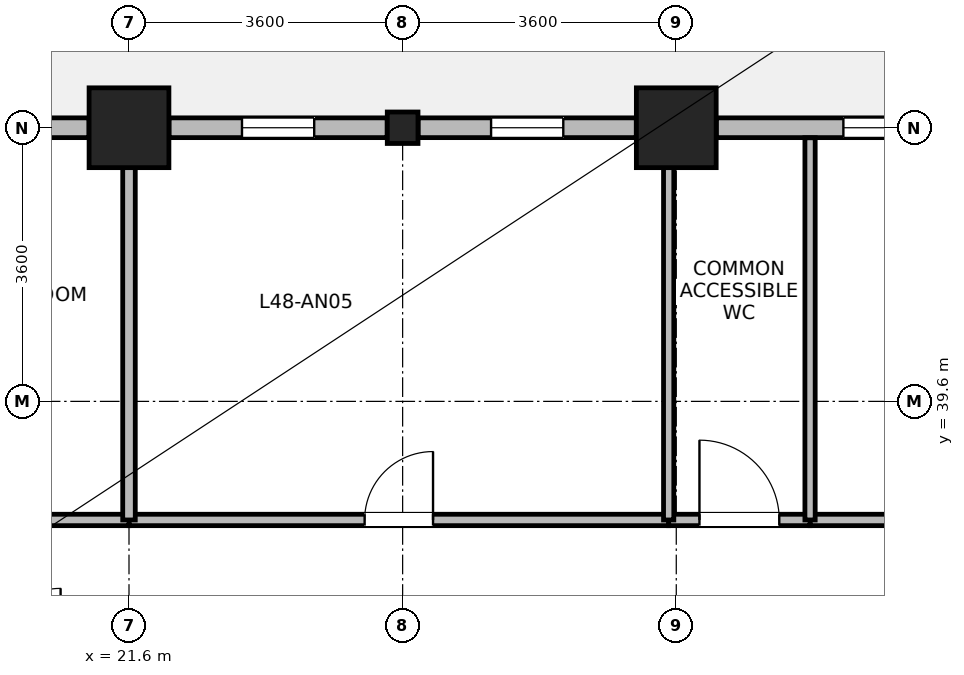
"""IFC4 building model, lengths in metres.
Left out: names, types, materials, properties, quantities, classifications, styles, units other than length and angle.
Written with IfcOpenShell. Run it as: python <this file> out.ifc"""

import sys

from ifc_helpers import new_model, si_unit, direction, frame, frame_2d, origin, origin_2d, place, context, subcontext, project, spatial, rectangle, i_section, extrude, source, transform, mapped, element, fill, save


model = new_model("IFC4")
c1 = context("Model", 3, precision=1e-05, world=origin(), true_north=direction((0.0, 1.0)))
c2 = subcontext(c1, "Body", "Model", "MODEL_VIEW")
j1 = project(units=[si_unit("LENGTHUNIT", "METRE"), si_unit("PLANEANGLEUNIT", "RADIAN")], contexts=[c1])
p1 = place(None, origin())
s1 = spatial("IfcSite", under=j1, at=p1, CompositionType="ELEMENT")
p2 = place(p1, origin())
s2 = spatial("IfcBuilding", under=s1, at=p2, CompositionType="ELEMENT")
p3 = place(p2, frame((0.0, 0.0, 188.3)))
s3 = spatial("IfcBuildingStorey", under=s2, at=p3, CompositionType="ELEMENT", Elevation=188.3)
m1 = source(origin(), c2, "Body", "SweptSolid", [
    extrude(rectangle(XDim=1.05, YDim=1.05, at=origin_2d()), origin(), (0.0, 0.0, 1.0), 3.7),
])
for number, where, z_axis, x_axis in (
    (1, (21.6, 43.2, 0.0), (0.0, 0.0, 1.0), (1.0, 0.0, 0.0)),
    (2, (28.8, 43.2, 0.0), (0.0, 0.0, 1.0), (1.0, 0.0, 0.0)),
):
    element("IfcColumn", number, at=place(p3, frame(where, z_axis=z_axis, x_axis=x_axis)), inside=s3, PredefinedType="COLUMN", context=c2, shape_type="MappedRepresentation", body=[
        mapped(m1, transform((0.0, 0.0, 0.0), x_axis=(1.0, 0.0, 0.0), y_axis=(0.0, 1.0, 0.0), z_axis=(0.0, 0.0, 1.0), scale=1.0)),
    ])
m2 = source(origin(), c2, "Body", "SweptSolid", [
    extrude(i_section(OverallWidth=0.404, OverallDepth=0.414, WebThickness=0.021, FlangeThickness=0.028, FilletRadius=0.015, at=origin_2d()), origin(), (0.0, 0.0, 1.0), 3.7),
])
p4 = place(p3, frame((25.2, 43.2, 0.0), z_axis=(0.0, 0.0, 1.0), x_axis=(1.0, 0.0, 0.0)))
e3 = element("IfcColumn", 3, at=p4, inside=s3, PredefinedType="COLUMN", context=c2, shape_type="MappedRepresentation", body=[
    mapped(m2, transform((0.0, 0.0, 0.0), x_axis=(1.0, 0.0, 0.0), y_axis=(0.0, 1.0, 0.0), z_axis=(0.0, 0.0, 1.0), scale=1.0)),
])
p5 = place(p3, frame((29.326, 43.2, 0.0), z_axis=(0.0, 0.0, 1.0), x_axis=(1.0, 0.0, 0.0)))
e4 = element("IfcWall", 4, at=p5, inside=s3, PredefinedType="STANDARD", context=c2, shape_type="SweptSolid", body=[
    extrude(rectangle(XDim=2.871, YDim=0.26, at=frame_2d((1.436, 0.0))), origin(), (0.0, 0.0, 1.0), 2.87),
])
p6 = place(p5, frame((1.673, 0.0, 0.85)))
e5 = element("IfcOpeningElement", 5, at=p6, cuts=e4, PredefinedType="OPENING", context=c2, shape_type="SweptSolid", body=[
    extrude(rectangle(XDim=0.95, YDim=1.75, at=frame_2d((0.475, 0.875))), frame((0.0, 0.14, 0.0), z_axis=(0.0, -1.0, 0.0), x_axis=(1.0, 0.0, 0.0)), (0.0, 0.0, 1.0), 0.28),
])
p7 = place(p3, frame((25.403, 43.2, 0.0), z_axis=(0.0, 0.0, 1.0), x_axis=(1.0, 0.0, 0.0)))
e6 = element("IfcWall", 6, at=p7, inside=s3, PredefinedType="STANDARD", context=c2, shape_type="SweptSolid", body=[
    extrude(rectangle(XDim=2.871, YDim=0.26, at=frame_2d((1.436, 0.0))), origin(), (0.0, 0.0, 1.0), 2.87),
])
p8 = place(p7, frame((0.96, 0.0, 0.85)))
e7 = element("IfcOpeningElement", 7, at=p8, cuts=e6, PredefinedType="OPENING", context=c2, shape_type="SweptSolid", body=[
    extrude(rectangle(XDim=0.95, YDim=1.75, at=frame_2d((0.475, 0.875))), frame((0.0, 0.14, 0.0), z_axis=(0.0, -1.0, 0.0), x_axis=(1.0, 0.0, 0.0)), (0.0, 0.0, 1.0), 0.28),
])
p9 = place(p3, frame((22.126, 43.2, 0.0), z_axis=(0.0, 0.0, 1.0), x_axis=(1.0, 0.0, 0.0)))
e8 = element("IfcWall", 8, at=p9, inside=s3, PredefinedType="STANDARD", context=c2, shape_type="SweptSolid", body=[
    extrude(rectangle(XDim=2.871, YDim=0.26, at=frame_2d((1.436, 0.0))), origin(), (0.0, 0.0, 1.0), 2.87),
])
p10 = place(p9, frame((0.96, 0.0, 0.85)))
e9 = element("IfcOpeningElement", 9, at=p10, cuts=e8, PredefinedType="OPENING", context=c2, shape_type="SweptSolid", body=[
    extrude(rectangle(XDim=0.95, YDim=1.75, at=frame_2d((0.475, 0.875))), frame((0.0, 0.14, 0.0), z_axis=(0.0, -1.0, 0.0), x_axis=(1.0, 0.0, 0.0)), (0.0, 0.0, 1.0), 0.28),
])
p11 = place(p3, frame((18.203, 43.2, 0.0), z_axis=(0.0, 0.0, 1.0), x_axis=(1.0, 0.0, 0.0)))
e10 = element("IfcWall", 10, at=p11, inside=s3, PredefinedType="STANDARD", context=c2, shape_type="SweptSolid", body=[
    extrude(rectangle(XDim=2.871, YDim=0.26, at=frame_2d((1.436, 0.0))), origin(), (0.0, 0.0, 1.0), 2.87),
])
p12 = place(p11, frame((0.96, 0.0, 0.85)))
e11 = element("IfcOpeningElement", 11, at=p12, cuts=e10, PredefinedType="OPENING", context=c2, shape_type="SweptSolid", body=[
    extrude(rectangle(XDim=0.95, YDim=1.75, at=frame_2d((0.475, 0.875))), frame((0.0, 0.14, 0.0), z_axis=(0.0, -1.0, 0.0), x_axis=(1.0, 0.0, 0.0)), (0.0, 0.0, 1.0), 0.28),
])
p13 = place(p3, frame((21.6, 38.04, 0.0), z_axis=(0.0, 0.0, 1.0), x_axis=(1.0, 0.0, 0.0)))
e12 = element("IfcWall", 12, at=p13, inside=s3, PredefinedType="PARTITIONING", context=c2, shape_type="SweptSolid", body=[
    extrude(rectangle(XDim=7.1, YDim=0.15, at=frame_2d((3.55, 0.0))), origin(), (0.0, 0.0, 1.0), 3.32),
])
p14 = place(p13, frame((3.1, 0.0, 0.0)))
e13 = element("IfcOpeningElement", 13, at=p14, cuts=e12, PredefinedType="OPENING", context=c2, shape_type="SweptSolid", body=[
    extrude(rectangle(XDim=0.9, YDim=2.08, at=frame_2d((0.45, 1.04))), frame((0.0, 0.085, 0.0), z_axis=(0.0, -1.0, 0.0), x_axis=(1.0, 0.0, 0.0)), (0.0, 0.0, 1.0), 0.17),
])
p15 = place(p3, frame((16.66, 38.04, 0.0), z_axis=(0.0, 0.0, 1.0), x_axis=(1.0, 0.0, 0.0)))
e14 = element("IfcWall", 14, at=p15, inside=s3, PredefinedType="PARTITIONING", context=c2, shape_type="SweptSolid", body=[
    extrude(rectangle(XDim=4.94, YDim=0.15, at=frame_2d((2.47, 0.0))), origin(), (0.0, 0.0, 1.0), 3.32),
])
p16 = place(p15, frame((1.995, 0.0, 0.0)))
e15 = element("IfcOpeningElement", 15, at=p16, cuts=e14, PredefinedType="OPENING", context=c2, shape_type="SweptSolid", body=[
    extrude(rectangle(XDim=0.95, YDim=2.1, at=frame_2d((0.475, 1.05))), frame((0.0, 0.085, 0.0), z_axis=(0.0, -1.0, 0.0), x_axis=(1.0, 0.0, 0.0)), (0.0, 0.0, 1.0), 0.17),
])
p17 = place(p3, frame((30.56, 38.04, 0.0), z_axis=(0.0, 0.0, 1.0), x_axis=(1.0, 0.0, 0.0)))
e16 = element("IfcWall", 16, at=p17, inside=s3, PredefinedType="PARTITIONING", context=c2, shape_type="SweptSolid", body=[
    extrude(rectangle(XDim=4.8, YDim=0.15, at=frame_2d((2.4, 0.0))), origin(), (0.0, 0.0, 1.0), 3.32),
])
p18 = place(p17, frame((1.75, 0.0, 0.0)))
e17 = element("IfcOpeningElement", 17, at=p18, cuts=e16, PredefinedType="OPENING", context=c2, shape_type="SweptSolid", body=[
    extrude(rectangle(XDim=1.3, YDim=2.12, at=frame_2d((0.65, 1.06))), frame((0.0, 0.085, 0.0), z_axis=(0.0, -1.0, 0.0), x_axis=(1.0, 0.0, 0.0)), (0.0, 0.0, 1.0), 0.17),
])
p19 = place(p3, frame((28.7, 38.04, 0.0), z_axis=(0.0, 0.0, 1.0), x_axis=(1.0, 0.0, 0.0)))
e18 = element("IfcWall", 18, at=p19, inside=s3, PredefinedType="PARTITIONING", context=c2, shape_type="SweptSolid", body=[
    extrude(rectangle(XDim=1.86, YDim=0.15, at=frame_2d((0.93, 0.0))), origin(), (0.0, 0.0, 1.0), 3.32),
])
p20 = place(p19, frame((0.405, 0.0, 0.0)))
e19 = element("IfcOpeningElement", 19, at=p20, cuts=e18, PredefinedType="OPENING", context=c2, shape_type="SweptSolid", body=[
    extrude(rectangle(XDim=1.05, YDim=2.12, at=frame_2d((0.525, 1.06))), frame((0.0, 0.085, 0.0), z_axis=(0.0, -1.0, 0.0), x_axis=(1.0, 0.0, 0.0)), (0.0, 0.0, 1.0), 0.17),
])
p21 = place(p3, frame((21.6, 38.04, 0.0), z_axis=(0.0, 0.0, 1.0), x_axis=(0.0, 1.0, 0.0)))
e20 = element("IfcWall", 20, at=p21, inside=s3, PredefinedType="PARTITIONING", context=c2, shape_type="SweptSolid", body=[
    extrude(rectangle(XDim=5.028, YDim=0.165, at=frame_2d((2.514, 0.0))), origin(), (0.0, 0.0, 1.0), 2.87),
])
p22 = place(p3, frame((28.7, 38.04, 0.0), z_axis=(0.0, 0.0, 1.0), x_axis=(0.0, 1.0, 0.0)))
e21 = element("IfcWall", 21, at=p22, inside=s3, PredefinedType="PARTITIONING", context=c2, shape_type="SweptSolid", body=[
    extrude(rectangle(XDim=5.028, YDim=0.135, at=frame_2d((2.514, 0.0))), origin(), (0.0, 0.0, 1.0), 2.87),
])
p23 = place(p3, frame((30.56, 38.04, 0.0), z_axis=(0.0, 0.0, 1.0), x_axis=(0.0, 1.0, 0.0)))
e22 = element("IfcWall", 22, at=p23, inside=s3, PredefinedType="PARTITIONING", context=c2, shape_type="SweptSolid", body=[
    extrude(rectangle(XDim=5.028, YDim=0.135, at=frame_2d((2.514, 0.0))), origin(), (0.0, 0.0, 1.0), 3.32),
])
p24 = place(p6, origin())
e23 = element("IfcWindow", 23, at=p24, inside=s3, PartitioningType="SINGLE_PANEL", PredefinedType="WINDOW", context=c2, shape_type="SweptSolid", body=[
    extrude(rectangle(XDim=0.95, YDim=1.75, at=frame_2d((0.475, 0.875))), frame((0.0, 0.03, 0.0), z_axis=(0.0, -1.0, 0.0), x_axis=(1.0, 0.0, 0.0)), (0.0, 0.0, 1.0), 0.06),
])
fill(e5, e23)
p25 = place(p8, origin())
e24 = element("IfcWindow", 24, at=p25, inside=s3, PartitioningType="SINGLE_PANEL", PredefinedType="WINDOW", context=c2, shape_type="SweptSolid", body=[
    extrude(rectangle(XDim=0.95, YDim=1.75, at=frame_2d((0.475, 0.875))), frame((0.0, 0.03, 0.0), z_axis=(0.0, -1.0, 0.0), x_axis=(1.0, 0.0, 0.0)), (0.0, 0.0, 1.0), 0.06),
])
fill(e7, e24)
p26 = place(p10, origin())
e25 = element("IfcWindow", 25, at=p26, inside=s3, PartitioningType="SINGLE_PANEL", PredefinedType="WINDOW", context=c2, shape_type="SweptSolid", body=[
    extrude(rectangle(XDim=0.95, YDim=1.75, at=frame_2d((0.475, 0.875))), frame((0.0, 0.03, 0.0), z_axis=(0.0, -1.0, 0.0), x_axis=(1.0, 0.0, 0.0)), (0.0, 0.0, 1.0), 0.06),
])
fill(e9, e25)
p27 = place(p14, origin())
e26 = element("IfcDoor", 26, at=p27, inside=s3, OperationType="SINGLE_SWING_RIGHT", PredefinedType="DOOR", context=c2, shape_type="SweptSolid", body=[
    extrude(rectangle(XDim=0.9, YDim=2.08, at=frame_2d((0.45, 1.04))), frame((0.0, 0.025, 0.0), z_axis=(0.0, -1.0, 0.0), x_axis=(1.0, 0.0, 0.0)), (0.0, 0.0, 1.0), 0.05),
])
fill(e13, e26)
p28 = place(p20, origin())
e27 = element("IfcDoor", 27, at=p28, inside=s3, OperationType="SINGLE_SWING_LEFT", PredefinedType="DOOR", context=c2, shape_type="SweptSolid", body=[
    extrude(rectangle(XDim=1.05, YDim=2.12, at=frame_2d((0.525, 1.06))), frame((0.0, 0.025, 0.0), z_axis=(0.0, -1.0, 0.0), x_axis=(1.0, 0.0, 0.0)), (0.0, 0.0, 1.0), 0.05),
])
fill(e19, e27)
save(model, sys.argv[1])
